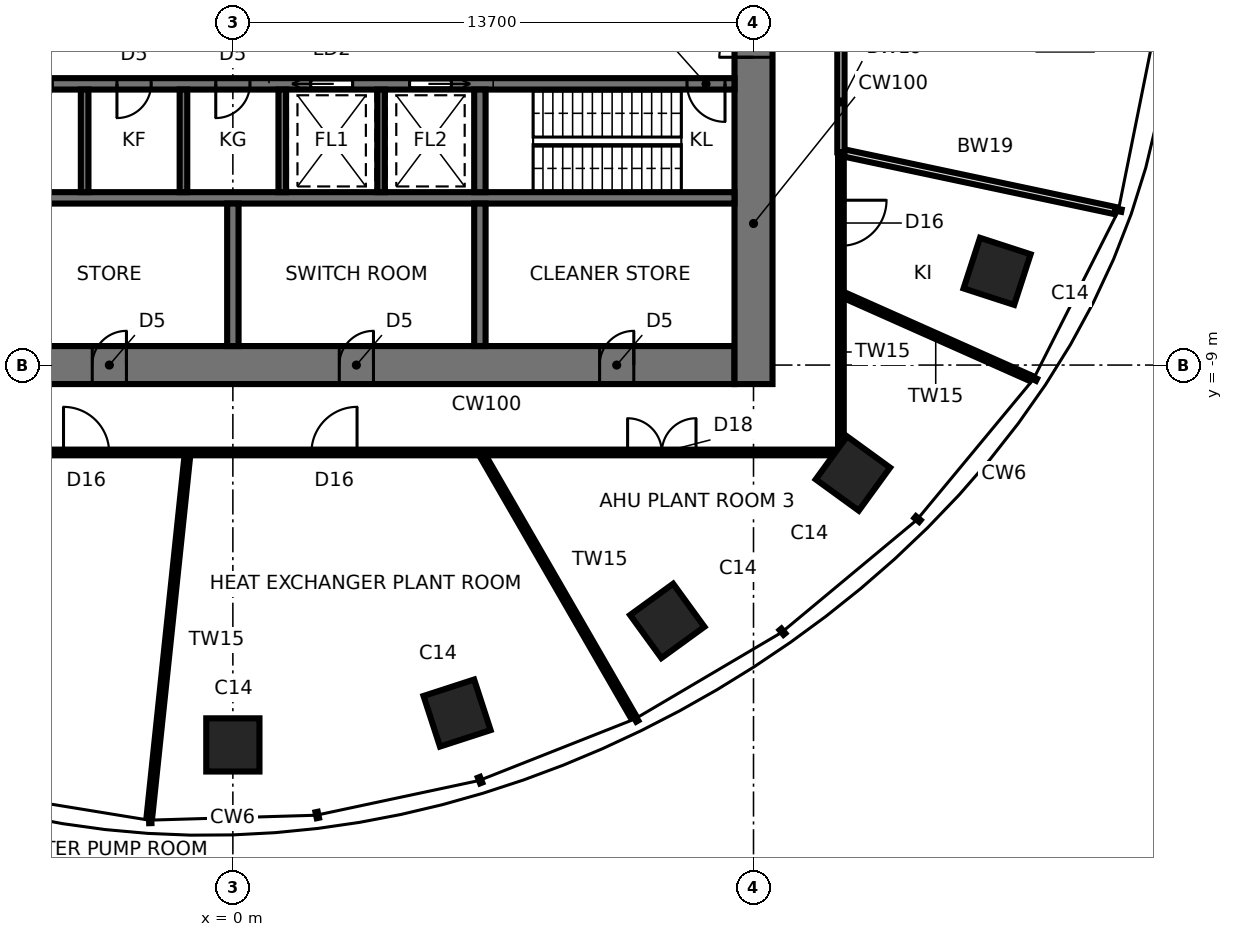
"""IFC4 building model, lengths in metres.
Left out: names, types, materials, properties, quantities, classifications, styles, units other than length and angle.
Written with IfcOpenShell. Run it as: python <this file> out.ifc"""

import sys

from ifc_helpers import new_model, si_unit, direction, frame, frame_2d, origin, origin_2d, place, context, subcontext, project, spatial, rectangle, extrude, element, fill, save


model = new_model("IFC4")
c1 = context("Model", 3, precision=1e-05, world=origin(), true_north=direction((0.0, 1.0)))
c2 = subcontext(c1, "Body", "Model", "MODEL_VIEW")
j1 = project(units=[si_unit("LENGTHUNIT", "METRE"), si_unit("PLANEANGLEUNIT", "RADIAN")], contexts=[c1])
p1 = place(None, origin())
s1 = spatial("IfcSite", under=j1, at=p1, CompositionType="ELEMENT")
p2 = place(p1, origin())
s2 = spatial("IfcBuilding", under=s1, at=p2, CompositionType="ELEMENT")
p3 = place(p2, frame((0.0, 0.0, 246.2)))
s3 = spatial("IfcBuildingStorey", under=s2, at=p3, CompositionType="ELEMENT", Elevation=246.2)
for number, where, z_axis, x_axis in (
    (1, (0.0, -18.996, 0.0), (0.0, 0.0, 1.0), (0.0, -1.0, 0.0)),
    (2, (5.9, -18.157, 0.0), (0.0, 0.0, 1.0), (0.309, -0.951, 0.0)),
    (3, (11.43, -15.733, 0.0), (0.0, 0.0, 1.0), (0.588, -0.809, 0.0)),
    (4, (16.315, -11.854, 0.0), (0.0, 0.0, 1.0), (0.809, -0.588, 0.0)),
    (5, (20.109, -6.534, 0.0), (0.0, 0.0, 1.0), (0.951, -0.309, 0.0)),
):
    element("IfcColumn", number, at=place(p3, frame(where, z_axis=z_axis, x_axis=x_axis)), inside=s3, PredefinedType="COLUMN", context=c2, shape_type="SweptSolid", body=[
        extrude(rectangle(XDim=1.4, YDim=1.4, at=origin_2d()), origin(), (0.0, 0.0, 1.0), 5.6),
    ])
p4 = place(p3, frame((-13.2, -9.0, 0.0), z_axis=(0.0, 0.0, 1.0), x_axis=(1.0, 0.0, 0.0)))
e6 = element("IfcWall", 6, at=p4, inside=s3, PredefinedType="SHEAR", context=c2, shape_type="SweptSolid", body=[
    extrude(rectangle(XDim=26.4, YDim=1.0, at=frame_2d((13.2, 0.0))), origin(), (0.0, 0.0, 1.0), 5.6),
])
p5 = place(p4, frame((2.65, 0.0, 0.0)))
e7 = element("IfcOpeningElement", 7, at=p5, cuts=e6, PredefinedType="OPENING", context=c2, shape_type="SweptSolid", body=[
    extrude(rectangle(XDim=0.9, YDim=2.1, at=frame_2d((0.45, 1.05))), frame((0.0, 0.51, 0.0), z_axis=(0.0, -1.0, 0.0), x_axis=(1.0, 0.0, 0.0)), (0.0, 0.0, 1.0), 1.02),
])
p6 = place(p4, frame((9.5, 0.0, 0.0)))
e8 = element("IfcOpeningElement", 8, at=p6, cuts=e6, PredefinedType="OPENING", context=c2, shape_type="SweptSolid", body=[
    extrude(rectangle(XDim=0.9, YDim=2.1, at=frame_2d((0.45, 1.05))), frame((0.0, 0.51, 0.0), z_axis=(0.0, -1.0, 0.0), x_axis=(1.0, 0.0, 0.0)), (0.0, 0.0, 1.0), 1.02),
])
p7 = place(p4, frame((16.0, 0.0, 0.0)))
e9 = element("IfcOpeningElement", 9, at=p7, cuts=e6, PredefinedType="OPENING", context=c2, shape_type="SweptSolid", body=[
    extrude(rectangle(XDim=0.9, YDim=2.1, at=frame_2d((0.45, 1.05))), frame((0.0, 0.51, 0.0), z_axis=(0.0, -1.0, 0.0), x_axis=(1.0, 0.0, 0.0)), (0.0, 0.0, 1.0), 1.02),
])
p8 = place(p4, frame((22.85, 0.0, 0.0)))
e10 = element("IfcOpeningElement", 10, at=p8, cuts=e6, PredefinedType="OPENING", context=c2, shape_type="SweptSolid", body=[
    extrude(rectangle(XDim=0.9, YDim=2.1, at=frame_2d((0.45, 1.05))), frame((0.0, 0.51, 0.0), z_axis=(0.0, -1.0, 0.0), x_axis=(1.0, 0.0, 0.0)), (0.0, 0.0, 1.0), 1.02),
])
p9 = place(p3, frame((13.7, -9.5, 0.0), z_axis=(0.0, 0.0, 1.0), x_axis=(0.0, 1.0, 0.0)))
e11 = element("IfcWall", 11, at=p9, inside=s3, PredefinedType="SHEAR", context=c2, shape_type="SweptSolid", body=[
    extrude(rectangle(XDim=19.0, YDim=1.0, at=frame_2d((9.5, 0.0))), origin(), (0.0, 0.0, 1.0), 5.6),
])
p10 = place(p9, frame((8.6, 0.0, 0.0)))
e12 = element("IfcOpeningElement", 12, at=p10, cuts=e11, PredefinedType="OPENING", context=c2, shape_type="SweptSolid", body=[
    extrude(rectangle(XDim=1.8, YDim=2.4, at=frame_2d((0.9, 1.2))), frame((0.0, 0.51, 0.0), z_axis=(0.0, -1.0, 0.0), x_axis=(1.0, 0.0, 0.0)), (0.0, 0.0, 1.0), 1.02),
])
p11 = place(p3, frame((-13.2, -1.6, 0.0), z_axis=(0.0, 0.0, 1.0), x_axis=(1.0, 0.0, 0.0)))
e13 = element("IfcWall", 13, at=p11, inside=s3, PredefinedType="SHEAR", context=c2, shape_type="SweptSolid", body=[
    extrude(rectangle(XDim=26.4, YDim=0.3, at=frame_2d((13.2, 0.0))), origin(), (0.0, 0.0, 1.0), 5.6),
])
p12 = place(p11, frame((25.15, 0.0, 0.0)))
e14 = element("IfcOpeningElement", 14, at=p12, cuts=e13, PredefinedType="OPENING", context=c2, shape_type="SweptSolid", body=[
    extrude(rectangle(XDim=1.0, YDim=2.1, at=frame_2d((0.5, 1.05))), frame((0.0, 0.16, 0.0), z_axis=(0.0, -1.0, 0.0), x_axis=(1.0, 0.0, 0.0)), (0.0, 0.0, 1.0), 0.32),
])
p13 = place(p11, frame((7.55, 0.0, 0.0)))
e15 = element("IfcOpeningElement", 15, at=p13, cuts=e13, PredefinedType="OPENING", context=c2, shape_type="SweptSolid", body=[
    extrude(rectangle(XDim=0.9, YDim=2.1, at=frame_2d((0.45, 1.05))), frame((0.0, 0.16, 0.0), z_axis=(0.0, -1.0, 0.0), x_axis=(1.0, 0.0, 0.0)), (0.0, 0.0, 1.0), 0.32),
])
p14 = place(p11, frame((10.15, 0.0, 0.0)))
e16 = element("IfcOpeningElement", 16, at=p14, cuts=e13, PredefinedType="OPENING", context=c2, shape_type="SweptSolid", body=[
    extrude(rectangle(XDim=0.9, YDim=2.1, at=frame_2d((0.45, 1.05))), frame((0.0, 0.16, 0.0), z_axis=(0.0, -1.0, 0.0), x_axis=(1.0, 0.0, 0.0)), (0.0, 0.0, 1.0), 0.32),
])
p15 = place(p11, frame((12.75, 0.0, 0.0)))
e17 = element("IfcOpeningElement", 17, at=p15, cuts=e13, PredefinedType="OPENING", context=c2, shape_type="SweptSolid", body=[
    extrude(rectangle(XDim=0.9, YDim=2.1, at=frame_2d((0.45, 1.05))), frame((0.0, 0.16, 0.0), z_axis=(0.0, -1.0, 0.0), x_axis=(1.0, 0.0, 0.0)), (0.0, 0.0, 1.0), 0.32),
])
p16 = place(p11, frame((15.25, 0.0, 0.0)))
e18 = element("IfcOpeningElement", 18, at=p16, cuts=e13, PredefinedType="OPENING", context=c2, shape_type="SweptSolid", body=[
    extrude(rectangle(XDim=1.1, YDim=2.3, at=frame_2d((0.55, 1.15))), frame((0.0, 0.16, 0.0), z_axis=(0.0, -1.0, 0.0), x_axis=(1.0, 0.0, 0.0)), (0.0, 0.0, 1.0), 0.32),
])
p17 = place(p11, frame((17.85, 0.0, 0.0)))
e19 = element("IfcOpeningElement", 19, at=p17, cuts=e13, PredefinedType="OPENING", context=c2, shape_type="SweptSolid", body=[
    extrude(rectangle(XDim=1.1, YDim=2.3, at=frame_2d((0.55, 1.15))), frame((0.0, 0.16, 0.0), z_axis=(0.0, -1.0, 0.0), x_axis=(1.0, 0.0, 0.0)), (0.0, 0.0, 1.0), 0.32),
])
p18 = place(p11, frame((5.55, 0.0, 0.0)))
e20 = element("IfcOpeningElement", 20, at=p18, cuts=e13, PredefinedType="OPENING", context=c2, shape_type="SweptSolid", body=[
    extrude(rectangle(XDim=0.9, YDim=2.1, at=frame_2d((0.45, 1.05))), frame((0.0, 0.16, 0.0), z_axis=(0.0, -1.0, 0.0), x_axis=(1.0, 0.0, 0.0)), (0.0, 0.0, 1.0), 0.32),
])
p19 = place(p3, frame((-13.2, -4.6, 0.0), z_axis=(0.0, 0.0, 1.0), x_axis=(1.0, 0.0, 0.0)))
e21 = element("IfcWall", 21, at=p19, inside=s3, PredefinedType="SHEAR", context=c2, shape_type="SweptSolid", body=[
    extrude(rectangle(XDim=26.4, YDim=0.3, at=frame_2d((13.2, 0.0))), origin(), (0.0, 0.0, 1.0), 5.6),
])
p20 = place(p3, frame((6.5, -1.75, 0.0), z_axis=(0.0, 0.0, 1.0), x_axis=(0.0, -1.0, 0.0)))
e22 = element("IfcWall", 22, at=p20, inside=s3, PredefinedType="SHEAR", context=c2, shape_type="SweptSolid", body=[
    extrude(rectangle(XDim=2.7, YDim=0.3, at=frame_2d((1.35, 0.0))), origin(), (0.0, 0.0, 1.0), 5.6),
])
p21 = place(p3, frame((6.5, -4.75, 0.0), z_axis=(0.0, 0.0, 1.0), x_axis=(0.0, -1.0, 0.0)))
e23 = element("IfcWall", 23, at=p21, inside=s3, PredefinedType="SHEAR", context=c2, shape_type="SweptSolid", body=[
    extrude(rectangle(XDim=3.75, YDim=0.3, at=frame_2d((1.875, 0.0))), origin(), (0.0, 0.0, 1.0), 5.6),
])
for number, where, z_axis, x_axis in (
    (24, (-3.9, -1.75, 0.0), (0.0, 0.0, 1.0), (0.0, -1.0, 0.0)),
    (25, (-1.3, -1.75, 0.0), (0.0, 0.0, 1.0), (0.0, -1.0, 0.0)),
    (26, (1.3, -1.75, 0.0), (0.0, 0.0, 1.0), (0.0, -1.0, 0.0)),
    (27, (3.9, -1.75, 0.0), (0.0, 0.0, 1.0), (0.0, -1.0, 0.0)),
):
    element("IfcWall", number, at=place(p3, frame(where, z_axis=z_axis, x_axis=x_axis)), inside=s3, PredefinedType="SHEAR", context=c2, shape_type="SweptSolid", body=[
        extrude(rectangle(XDim=2.7, YDim=0.2, at=frame_2d((1.35, 0.0))), origin(), (0.0, 0.0, 1.0), 5.6),
    ])
p22 = place(p3, frame((0.0, -4.75, 0.0), z_axis=(0.0, 0.0, 1.0), x_axis=(0.0, -1.0, 0.0)))
e28 = element("IfcWall", 28, at=p22, inside=s3, PredefinedType="SHEAR", context=c2, shape_type="SweptSolid", body=[
    extrude(rectangle(XDim=3.75, YDim=0.3, at=frame_2d((1.875, 0.0))), origin(), (0.0, 0.0, 1.0), 5.6),
])
p23 = place(p3, frame((-1.188, -11.3, 0.0), z_axis=(0.0, 0.0, 1.0), x_axis=(-0.10452541089, -0.994522216181, 0.0)))
e29 = element("IfcWall", 29, at=p23, inside=s3, PredefinedType="PARTITIONING", context=c2, shape_type="SweptSolid", body=[
    extrude(rectangle(XDim=9.649, YDim=0.15, at=frame_2d((4.824, 0.0))), origin(), (0.0, 0.0, 1.0), 5.4),
])
p24 = place(p3, frame((-16.0, -11.3, 0.0), z_axis=(0.0, 0.0, 1.0), x_axis=(1.0, 0.0, 0.0)))
e30 = element("IfcWall", 30, at=p24, inside=s3, PredefinedType="PARTITIONING", context=c2, shape_type="SweptSolid", body=[
    extrude(rectangle(XDim=32.0, YDim=0.15, at=frame_2d((16.0, 0.0))), origin(), (0.0, 0.0, 1.0), 5.4),
])
p25 = place(p24, frame((7.026, 0.0, 0.0)))
e31 = element("IfcOpeningElement", 31, at=p25, cuts=e30, PredefinedType="OPENING", context=c2, shape_type="SweptSolid", body=[
    extrude(rectangle(XDim=1.2, YDim=2.1, at=frame_2d((0.6, 1.05))), frame((0.0, 0.085, 0.0), z_axis=(0.0, -1.0, 0.0), x_axis=(1.0, 0.0, 0.0)), (0.0, 0.0, 1.0), 0.17),
])
p26 = place(p24, frame((11.544, 0.0, 0.0)))
e32 = element("IfcOpeningElement", 32, at=p26, cuts=e30, PredefinedType="OPENING", context=c2, shape_type="SweptSolid", body=[
    extrude(rectangle(XDim=1.2, YDim=2.1, at=frame_2d((0.6, 1.05))), frame((0.0, 0.085, 0.0), z_axis=(0.0, -1.0, 0.0), x_axis=(1.0, 0.0, 0.0)), (0.0, 0.0, 1.0), 0.17),
])
p27 = place(p24, frame((18.068, 0.0, 0.0)))
e33 = element("IfcOpeningElement", 33, at=p27, cuts=e30, PredefinedType="OPENING", context=c2, shape_type="SweptSolid", body=[
    extrude(rectangle(XDim=1.2, YDim=2.1, at=frame_2d((0.6, 1.05))), frame((0.0, 0.085, 0.0), z_axis=(0.0, -1.0, 0.0), x_axis=(1.0, 0.0, 0.0)), (0.0, 0.0, 1.0), 0.17),
])
p28 = place(p24, frame((26.387, 0.0, 0.0)))
e34 = element("IfcOpeningElement", 34, at=p28, cuts=e30, PredefinedType="OPENING", context=c2, shape_type="SweptSolid", body=[
    extrude(rectangle(XDim=1.8, YDim=2.4, at=frame_2d((0.9, 1.2))), frame((0.0, 0.085, 0.0), z_axis=(0.0, -1.0, 0.0), x_axis=(1.0, 0.0, 0.0)), (0.0, 0.0, 1.0), 0.17),
])
p29 = place(p3, frame((6.524, -11.3, 0.0), z_axis=(0.0, 0.0, 1.0), x_axis=(0.499985955615, -0.866033512162, 0.0)))
e35 = element("IfcWall", 35, at=p29, inside=s3, PredefinedType="PARTITIONING", context=c2, shape_type="SweptSolid", body=[
    extrude(rectangle(XDim=8.02, YDim=0.15, at=frame_2d((4.01, 0.0))), origin(), (0.0, 0.0, 1.0), 5.4),
])
p30 = place(p3, frame((16.0, -11.3, 0.0), z_axis=(0.0, 0.0, 1.0), x_axis=(0.0, 1.0, 0.0)))
e36 = element("IfcWall", 36, at=p30, inside=s3, PredefinedType="PARTITIONING", context=c2, shape_type="SweptSolid", body=[
    extrude(rectangle(XDim=7.899, YDim=0.15, at=frame_2d((3.95, 0.0))), origin(), (0.0, 0.0, 1.0), 5.4),
])
p31 = place(p30, frame((5.438, 0.0, 0.0)))
e37 = element("IfcOpeningElement", 37, at=p31, cuts=e36, PredefinedType="OPENING", context=c2, shape_type="SweptSolid", body=[
    extrude(rectangle(XDim=1.2, YDim=2.1, at=frame_2d((0.6, 1.05))), frame((0.0, 0.085, 0.0), z_axis=(0.0, -1.0, 0.0), x_axis=(1.0, 0.0, 0.0)), (0.0, 0.0, 1.0), 0.17),
])
p32 = place(p3, frame((16.0, -7.124, 0.0), z_axis=(0.0, 0.0, 1.0), x_axis=(0.913549580234, -0.406727383458, 0.0)))
e38 = element("IfcWall", 38, at=p32, inside=s3, PredefinedType="PARTITIONING", context=c2, shape_type="SweptSolid", body=[
    extrude(rectangle(XDim=5.461, YDim=0.15, at=frame_2d((2.73, 0.0))), origin(), (0.0, 0.0, 1.0), 5.4),
])
p33 = place(p3, frame((16.0, -3.401, 0.0), z_axis=(0.0, 0.0, 1.0), x_axis=(0.978142451548, -0.207935914357, 0.0)))
e39 = element("IfcWall", 39, at=p33, inside=s3, PredefinedType="SOLIDWALL", context=c2, shape_type="SweptSolid", body=[
    extrude(rectangle(XDim=7.379, YDim=0.19, at=frame_2d((3.69, 0.0))), origin(), (0.0, 0.0, 1.0), 5.4),
])
p34 = place(p3, frame((16.0, -3.401, 0.0), z_axis=(0.0, 0.0, 1.0), x_axis=(0.0, 1.0, 0.0)))
e40 = element("IfcWall", 40, at=p34, inside=s3, PredefinedType="SOLIDWALL", context=c2, shape_type="SweptSolid", body=[
    extrude(rectangle(XDim=6.802, YDim=0.19, at=frame_2d((3.401, 0.0))), origin(), (0.0, 0.0, 1.0), 5.4),
])
p35 = place(p34, frame((2.801, 0.0, 0.0)))
e41 = element("IfcOpeningElement", 41, at=p35, cuts=e40, PredefinedType="OPENING", context=c2, shape_type="SweptSolid", body=[
    extrude(rectangle(XDim=1.2, YDim=2.1, at=frame_2d((0.6, 1.05))), frame((0.0, 0.105, 0.0), z_axis=(0.0, -1.0, 0.0), x_axis=(1.0, 0.0, 0.0)), (0.0, 0.0, 1.0), 0.21),
])
p36 = place(p10, origin())
e42 = element("IfcDoor", 42, at=p36, inside=s3, OperationType="DOUBLE_DOOR_SINGLE_SWING", PredefinedType="DOOR", context=c2, shape_type="SweptSolid", body=[
    extrude(rectangle(XDim=1.72, YDim=2.36, at=frame_2d((0.9, 1.18))), frame((0.0, 0.025, 0.0), z_axis=(0.0, -1.0, 0.0), x_axis=(1.0, 0.0, 0.0)), (0.0, 0.0, 1.0), 0.05),
    extrude(rectangle(XDim=0.04, YDim=2.4, at=frame_2d((0.02, 1.2))), frame((0.0, 0.25, 0.0), z_axis=(0.0, -1.0, 0.0), x_axis=(1.0, 0.0, 0.0)), (0.0, 0.0, 1.0), 0.5),
    extrude(rectangle(XDim=0.04, YDim=2.4, at=frame_2d((1.78, 1.2))), frame((0.0, 0.25, 0.0), z_axis=(0.0, -1.0, 0.0), x_axis=(1.0, 0.0, 0.0)), (0.0, 0.0, 1.0), 0.5),
    extrude(rectangle(XDim=1.72, YDim=0.04, at=frame_2d((0.9, 2.38))), frame((0.0, 0.25, 0.0), z_axis=(0.0, -1.0, 0.0), x_axis=(1.0, 0.0, 0.0)), (0.0, 0.0, 1.0), 0.5),
])
fill(e12, e42)
p37 = place(p12, frame((1.0, 0.0, 0.0), z_axis=(0.0, 0.0, 1.0), x_axis=(-1.0, 0.0, 0.0)))
e43 = element("IfcDoor", 43, at=p37, inside=s3, OperationType="SINGLE_SWING_LEFT", PredefinedType="DOOR", context=c2, shape_type="SweptSolid", body=[
    extrude(rectangle(XDim=1.0, YDim=2.1, at=frame_2d((0.5, 1.05))), frame((0.0, 0.025, 0.0), z_axis=(0.0, -1.0, 0.0), x_axis=(1.0, 0.0, 0.0)), (0.0, 0.0, 1.0), 0.05),
])
fill(e14, e43)
p38 = place(p14, frame((0.9, 0.0, 0.0), z_axis=(0.0, 0.0, 1.0), x_axis=(-1.0, 0.0, 0.0)))
e44 = element("IfcDoor", 44, at=p38, inside=s3, OperationType="SINGLE_SWING_RIGHT", PredefinedType="DOOR", context=c2, shape_type="SweptSolid", body=[
    extrude(rectangle(XDim=0.9, YDim=2.1, at=frame_2d((0.45, 1.05))), frame((0.0, 0.025, 0.0), z_axis=(0.0, -1.0, 0.0), x_axis=(1.0, 0.0, 0.0)), (0.0, 0.0, 1.0), 0.05),
])
fill(e16, e44)
p39 = place(p15, frame((0.9, 0.0, 0.0), z_axis=(0.0, 0.0, 1.0), x_axis=(-1.0, 0.0, 0.0)))
e45 = element("IfcDoor", 45, at=p39, inside=s3, OperationType="SINGLE_SWING_RIGHT", PredefinedType="DOOR", context=c2, shape_type="SweptSolid", body=[
    extrude(rectangle(XDim=0.9, YDim=2.1, at=frame_2d((0.45, 1.05))), frame((0.0, 0.025, 0.0), z_axis=(0.0, -1.0, 0.0), x_axis=(1.0, 0.0, 0.0)), (0.0, 0.0, 1.0), 0.05),
])
fill(e17, e45)
p40 = place(p16, frame((1.1, 0.0, 0.0), z_axis=(0.0, 0.0, 1.0), x_axis=(-1.0, 0.0, 0.0)))
e46 = element("IfcDoor", 46, at=p40, inside=s3, OperationType="SLIDING_TO_RIGHT", PredefinedType="DOOR", context=c2, shape_type="SweptSolid", body=[
    extrude(rectangle(XDim=1.1, YDim=2.3, at=frame_2d((0.55, 1.15))), frame((0.0, 0.025, 0.0), z_axis=(0.0, -1.0, 0.0), x_axis=(1.0, 0.0, 0.0)), (0.0, 0.0, 1.0), 0.05),
])
fill(e18, e46)
p41 = place(p17, frame((1.1, 0.0, 0.0), z_axis=(0.0, 0.0, 1.0), x_axis=(-1.0, 0.0, 0.0)))
e47 = element("IfcDoor", 47, at=p41, inside=s3, OperationType="SLIDING_TO_LEFT", PredefinedType="DOOR", context=c2, shape_type="SweptSolid", body=[
    extrude(rectangle(XDim=1.1, YDim=2.3, at=frame_2d((0.55, 1.15))), frame((0.0, 0.025, 0.0), z_axis=(0.0, -1.0, 0.0), x_axis=(1.0, 0.0, 0.0)), (0.0, 0.0, 1.0), 0.05),
])
fill(e19, e47)
p42 = place(p6, origin())
e48 = element("IfcDoor", 48, at=p42, inside=s3, OperationType="SINGLE_SWING_RIGHT", PredefinedType="DOOR", context=c2, shape_type="SweptSolid", body=[
    extrude(rectangle(XDim=0.82, YDim=2.06, at=frame_2d((0.45, 1.03))), frame((0.0, 0.025, 0.0), z_axis=(0.0, -1.0, 0.0), x_axis=(1.0, 0.0, 0.0)), (0.0, 0.0, 1.0), 0.05),
    extrude(rectangle(XDim=0.04, YDim=2.1, at=frame_2d((0.02, 1.05))), frame((0.0, 0.25, 0.0), z_axis=(0.0, -1.0, 0.0), x_axis=(1.0, 0.0, 0.0)), (0.0, 0.0, 1.0), 0.5),
    extrude(rectangle(XDim=0.04, YDim=2.1, at=frame_2d((0.88, 1.05))), frame((0.0, 0.25, 0.0), z_axis=(0.0, -1.0, 0.0), x_axis=(1.0, 0.0, 0.0)), (0.0, 0.0, 1.0), 0.5),
    extrude(rectangle(XDim=0.82, YDim=0.04, at=frame_2d((0.45, 2.08))), frame((0.0, 0.25, 0.0), z_axis=(0.0, -1.0, 0.0), x_axis=(1.0, 0.0, 0.0)), (0.0, 0.0, 1.0), 0.5),
])
fill(e8, e48)
p43 = place(p7, origin())
e49 = element("IfcDoor", 49, at=p43, inside=s3, OperationType="SINGLE_SWING_RIGHT", PredefinedType="DOOR", context=c2, shape_type="SweptSolid", body=[
    extrude(rectangle(XDim=0.82, YDim=2.06, at=frame_2d((0.45, 1.03))), frame((0.0, 0.025, 0.0), z_axis=(0.0, -1.0, 0.0), x_axis=(1.0, 0.0, 0.0)), (0.0, 0.0, 1.0), 0.05),
    extrude(rectangle(XDim=0.04, YDim=2.1, at=frame_2d((0.02, 1.05))), frame((0.0, 0.25, 0.0), z_axis=(0.0, -1.0, 0.0), x_axis=(1.0, 0.0, 0.0)), (0.0, 0.0, 1.0), 0.5),
    extrude(rectangle(XDim=0.04, YDim=2.1, at=frame_2d((0.88, 1.05))), frame((0.0, 0.25, 0.0), z_axis=(0.0, -1.0, 0.0), x_axis=(1.0, 0.0, 0.0)), (0.0, 0.0, 1.0), 0.5),
    extrude(rectangle(XDim=0.82, YDim=0.04, at=frame_2d((0.45, 2.08))), frame((0.0, 0.25, 0.0), z_axis=(0.0, -1.0, 0.0), x_axis=(1.0, 0.0, 0.0)), (0.0, 0.0, 1.0), 0.5),
])
fill(e9, e49)
p44 = place(p8, origin())
e50 = element("IfcDoor", 50, at=p44, inside=s3, OperationType="SINGLE_SWING_RIGHT", PredefinedType="DOOR", context=c2, shape_type="SweptSolid", body=[
    extrude(rectangle(XDim=0.82, YDim=2.06, at=frame_2d((0.45, 1.03))), frame((0.0, 0.025, 0.0), z_axis=(0.0, -1.0, 0.0), x_axis=(1.0, 0.0, 0.0)), (0.0, 0.0, 1.0), 0.05),
    extrude(rectangle(XDim=0.04, YDim=2.1, at=frame_2d((0.02, 1.05))), frame((0.0, 0.25, 0.0), z_axis=(0.0, -1.0, 0.0), x_axis=(1.0, 0.0, 0.0)), (0.0, 0.0, 1.0), 0.5),
    extrude(rectangle(XDim=0.04, YDim=2.1, at=frame_2d((0.88, 1.05))), frame((0.0, 0.25, 0.0), z_axis=(0.0, -1.0, 0.0), x_axis=(1.0, 0.0, 0.0)), (0.0, 0.0, 1.0), 0.5),
    extrude(rectangle(XDim=0.82, YDim=0.04, at=frame_2d((0.45, 2.08))), frame((0.0, 0.25, 0.0), z_axis=(0.0, -1.0, 0.0), x_axis=(1.0, 0.0, 0.0)), (0.0, 0.0, 1.0), 0.5),
])
fill(e10, e50)
p45 = place(p26, origin())
e51 = element("IfcDoor", 51, at=p45, inside=s3, OperationType="SINGLE_SWING_LEFT", PredefinedType="DOOR", context=c2, shape_type="SweptSolid", body=[
    extrude(rectangle(XDim=1.2, YDim=2.1, at=frame_2d((0.6, 1.05))), frame((0.0, 0.025, 0.0), z_axis=(0.0, -1.0, 0.0), x_axis=(1.0, 0.0, 0.0)), (0.0, 0.0, 1.0), 0.05),
])
fill(e32, e51)
p46 = place(p27, origin())
e52 = element("IfcDoor", 52, at=p46, inside=s3, OperationType="SINGLE_SWING_RIGHT", PredefinedType="DOOR", context=c2, shape_type="SweptSolid", body=[
    extrude(rectangle(XDim=1.2, YDim=2.1, at=frame_2d((0.6, 1.05))), frame((0.0, 0.025, 0.0), z_axis=(0.0, -1.0, 0.0), x_axis=(1.0, 0.0, 0.0)), (0.0, 0.0, 1.0), 0.05),
])
fill(e33, e52)
p47 = place(p28, origin())
e53 = element("IfcDoor", 53, at=p47, inside=s3, OperationType="DOUBLE_DOOR_SINGLE_SWING", PredefinedType="DOOR", context=c2, shape_type="SweptSolid", body=[
    extrude(rectangle(XDim=1.8, YDim=2.4, at=frame_2d((0.9, 1.2))), frame((0.0, 0.025, 0.0), z_axis=(0.0, -1.0, 0.0), x_axis=(1.0, 0.0, 0.0)), (0.0, 0.0, 1.0), 0.05),
])
fill(e34, e53)
p48 = place(p31, frame((1.2, 0.0, 0.0), z_axis=(0.0, 0.0, 1.0), x_axis=(-1.0, 0.0, 0.0)))
e54 = element("IfcDoor", 54, at=p48, inside=s3, OperationType="SINGLE_SWING_LEFT", PredefinedType="DOOR", context=c2, shape_type="SweptSolid", body=[
    extrude(rectangle(XDim=1.2, YDim=2.1, at=frame_2d((0.6, 1.05))), frame((0.0, 0.025, 0.0), z_axis=(0.0, -1.0, 0.0), x_axis=(1.0, 0.0, 0.0)), (0.0, 0.0, 1.0), 0.05),
])
fill(e37, e54)
save(model, sys.argv[1])
